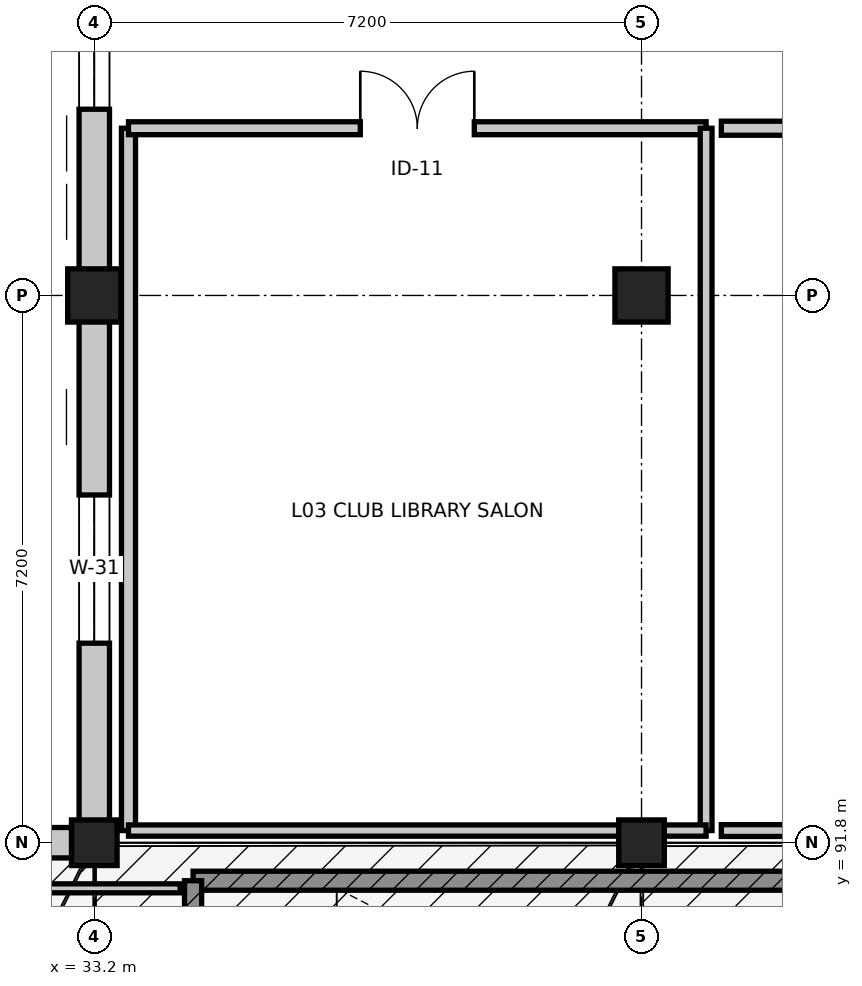
"""IFC4 building model, lengths in metres.
Left out: names, types, materials, properties, quantities, classifications, styles, units other than length and angle.
Written with IfcOpenShell. Run it as: python <this file> out.ifc"""

import sys

from ifc_helpers import new_model, si_unit, direction, frame, frame_2d, origin, origin_2d, place, context, subcontext, project, spatial, rectangle, extrude, element, fill, save


model = new_model("IFC4")
c1 = context("Model", 3, precision=1e-05, world=origin(), true_north=direction((0.0, 1.0)))
c2 = subcontext(c1, "Body", "Model", "MODEL_VIEW")
j1 = project(units=[si_unit("LENGTHUNIT", "METRE"), si_unit("PLANEANGLEUNIT", "RADIAN")], contexts=[c1])
p1 = place(None, origin())
s1 = spatial("IfcSite", under=j1, at=p1, CompositionType="ELEMENT")
p2 = place(p1, origin())
s2 = spatial("IfcBuilding", under=s1, at=p2, CompositionType="ELEMENT")
p3 = place(p2, frame((0.0, 0.0, 15.0)))
s3 = spatial("IfcBuildingStorey", under=s2, at=p3, CompositionType="ELEMENT", Elevation=15.0)
p4 = place(p3, frame((33.2, 91.8, 0.0), z_axis=(0.0, 0.0, 1.0), x_axis=(1.0, 0.0, 0.0)))
e1 = element("IfcColumn", 1, at=p4, inside=s3, PredefinedType="COLUMN", context=c2, shape_type="SweptSolid", body=[
    extrude(rectangle(XDim=0.6, YDim=0.6, at=origin_2d()), origin(), (0.0, 0.0, 1.0), 4.2),
])
p5 = place(p3, frame((33.2, 99.0, 0.0), z_axis=(0.0, 0.0, 1.0), x_axis=(1.0, 0.0, 0.0)))
e2 = element("IfcColumn", 2, at=p5, inside=s3, PredefinedType="COLUMN", context=c2, shape_type="SweptSolid", body=[
    extrude(rectangle(XDim=0.7, YDim=0.7, at=origin_2d()), origin(), (0.0, 0.0, 1.0), 4.2),
])
p6 = place(p3, frame((40.4, 91.8, 0.0), z_axis=(0.0, 0.0, 1.0), x_axis=(1.0, 0.0, 0.0)))
e3 = element("IfcColumn", 3, at=p6, inside=s3, PredefinedType="COLUMN", context=c2, shape_type="SweptSolid", body=[
    extrude(rectangle(XDim=0.6, YDim=0.6, at=origin_2d()), origin(), (0.0, 0.0, 1.0), 4.2),
])
p7 = place(p3, frame((40.4, 99.0, 0.0), z_axis=(0.0, 0.0, 1.0), x_axis=(1.0, 0.0, 0.0)))
e4 = element("IfcColumn", 4, at=p7, inside=s3, PredefinedType="COLUMN", context=c2, shape_type="SweptSolid", body=[
    extrude(rectangle(XDim=0.7, YDim=0.7, at=origin_2d()), origin(), (0.0, 0.0, 1.0), 4.2),
])
p8 = place(p3, frame((26.0, 91.8, 0.0), z_axis=(0.0, 0.0, 1.0), x_axis=(1.0, 0.0, 0.0)))
e5 = element("IfcWall", 5, at=p8, inside=s3, PredefinedType="STANDARD", context=c2, shape_type="SweptSolid", body=[
    extrude(rectangle(XDim=7.2, YDim=0.4, at=frame_2d((3.6, 0.0))), origin(), (0.0, 0.0, 1.0), 3.516),
])
p9 = place(p8, frame((2.8, 0.0, 0.9)))
e6 = element("IfcOpeningElement", 6, at=p9, cuts=e5, PredefinedType="OPENING", context=c2, shape_type="SweptSolid", body=[
    extrude(rectangle(XDim=1.6, YDim=1.95, at=frame_2d((0.8, 0.975))), frame((0.0, 0.21, 0.0), z_axis=(0.0, -1.0, 0.0), x_axis=(1.0, 0.0, 0.0)), (0.0, 0.0, 1.0), 0.42),
])
p10 = place(p8, frame((4.95, 0.0, 0.85)))
e7 = element("IfcOpeningElement", 7, at=p10, cuts=e5, PredefinedType="OPENING", context=c2, shape_type="SweptSolid", body=[
    extrude(rectangle(XDim=1.2, YDim=1.8, at=frame_2d((0.6, 0.9))), frame((0.0, 0.21, 0.0), z_axis=(0.0, -1.0, 0.0), x_axis=(1.0, 0.0, 0.0)), (0.0, 0.0, 1.0), 0.42),
])
p11 = place(p3, frame((33.2, 91.8, 0.0), z_axis=(0.0, 0.0, 1.0), x_axis=(0.0, 1.0, 0.0)))
e8 = element("IfcWall", 8, at=p11, inside=s3, PredefinedType="STANDARD", context=c2, shape_type="SweptSolid", body=[
    extrude(rectangle(XDim=7.2, YDim=0.4, at=frame_2d((3.6, 0.0))), origin(), (0.0, 0.0, 1.0), 3.275),
])
p12 = place(p11, frame((2.625, 0.0, 0.9)))
e9 = element("IfcOpeningElement", 9, at=p12, cuts=e8, PredefinedType="OPENING", context=c2, shape_type="SweptSolid", body=[
    extrude(rectangle(XDim=1.95, YDim=1.95, at=frame_2d((0.975, 0.975))), frame((0.0, 0.21, 0.0), z_axis=(0.0, -1.0, 0.0), x_axis=(1.0, 0.0, 0.0)), (0.0, 0.0, 1.0), 0.42),
])
p13 = place(p3, frame((33.2, 99.0, 0.0), z_axis=(0.0, 0.0, 1.0), x_axis=(0.0, 1.0, 0.0)))
e10 = element("IfcWall", 10, at=p13, inside=s3, PredefinedType="STANDARD", context=c2, shape_type="SweptSolid", body=[
    extrude(rectangle(XDim=7.2, YDim=0.4, at=frame_2d((3.6, 0.0))), origin(), (0.0, 0.0, 1.0), 3.275),
])
p14 = place(p13, frame((2.45, 0.0, 0.9)))
e11 = element("IfcOpeningElement", 11, at=p14, cuts=e10, PredefinedType="OPENING", context=c2, shape_type="SweptSolid", body=[
    extrude(rectangle(XDim=2.3, YDim=1.95, at=frame_2d((1.15, 0.975))), frame((0.0, 0.21, 0.0), z_axis=(0.0, -1.0, 0.0), x_axis=(1.0, 0.0, 0.0)), (0.0, 0.0, 1.0), 0.42),
])
p15 = place(p3, frame((43.1, 91.3, 0.0), z_axis=(0.0, 0.0, 1.0), x_axis=(-1.0, 0.0, 0.0)))
e12 = element("IfcWall", 12, at=p15, inside=s3, PredefinedType="SHEAR", context=c2, shape_type="SweptSolid", body=[
    extrude(rectangle(XDim=8.6, YDim=0.25, at=frame_2d((4.3, 0.0))), origin(), (0.0, 0.0, 1.0), 3.8),
])
p16 = place(p3, frame((34.5, 91.3, 0.0), z_axis=(0.0, 0.0, 1.0), x_axis=(0.0, -1.0, 0.0)))
e13 = element("IfcWall", 13, at=p16, inside=s3, PredefinedType="SHEAR", context=c2, shape_type="SweptSolid", body=[
    extrude(rectangle(XDim=3.6, YDim=0.225, at=frame_2d((1.8, 0.0))), origin(), (0.0, 0.0, 1.0), 3.8),
])
p17 = place(p3, frame((33.65, 91.96, 0.0), z_axis=(0.0, 0.0, 1.0), x_axis=(0.0, 1.0, 0.0)))
e14 = element("IfcWall", 14, at=p17, inside=s3, PredefinedType="PARTITIONING", context=c2, shape_type="SweptSolid", body=[
    extrude(rectangle(XDim=9.24, YDim=0.185, at=frame_2d((4.62, 0.0))), origin(), (0.0, 0.0, 1.0), 3.325),
])
p18 = place(p3, frame((33.65, 101.2, 0.0), z_axis=(0.0, 0.0, 1.0), x_axis=(1.0, 0.0, 0.0)))
e15 = element("IfcWall", 15, at=p18, inside=s3, PredefinedType="PARTITIONING", context=c2, shape_type="SweptSolid", body=[
    extrude(rectangle(XDim=7.6, YDim=0.17, at=frame_2d((3.8, 0.0))), origin(), (0.0, 0.0, 1.0), 3.275),
])
p19 = place(p18, frame((3.05, 0.0, 0.0)))
e16 = element("IfcOpeningElement", 16, at=p19, cuts=e15, PredefinedType="OPENING", context=c2, shape_type="SweptSolid", body=[
    extrude(rectangle(XDim=1.5, YDim=2.2, at=frame_2d((0.75, 1.1))), frame((0.0, 0.095, 0.0), z_axis=(0.0, -1.0, 0.0), x_axis=(1.0, 0.0, 0.0)), (0.0, 0.0, 1.0), 0.19),
])
p20 = place(p3, frame((41.25, 101.2, 0.0), z_axis=(0.0, 0.0, 1.0), x_axis=(0.0, -1.0, 0.0)))
e17 = element("IfcWall", 17, at=p20, inside=s3, PredefinedType="PARTITIONING", context=c2, shape_type="SweptSolid", body=[
    extrude(rectangle(XDim=9.24, YDim=0.155, at=frame_2d((4.62, 0.0))), origin(), (0.0, 0.0, 1.0), 3.325),
])
p21 = place(p3, frame((41.25, 91.96, 0.0), z_axis=(0.0, 0.0, 1.0), x_axis=(-1.0, 0.0, 0.0)))
e18 = element("IfcWall", 18, at=p21, inside=s3, PredefinedType="PARTITIONING", context=c2, shape_type="SweptSolid", body=[
    extrude(rectangle(XDim=7.6, YDim=0.148, at=frame_2d((3.8, 0.0))), origin(), (0.0, 0.0, 1.0), 3.325),
])
p22 = place(p3, frame((41.45, 101.2, 0.0), z_axis=(0.0, 0.0, 1.0), x_axis=(1.0, 0.0, 0.0)))
e19 = element("IfcWall", 19, at=p22, inside=s3, PredefinedType="PARTITIONING", context=c2, shape_type="SweptSolid", body=[
    extrude(rectangle(XDim=27.55, YDim=0.185, at=frame_2d((13.775, 0.0))), origin(), (0.0, 0.0, 1.0), 3.275),
])
p23 = place(p22, frame((12.85, 0.0, 0.0)))
e20 = element("IfcOpeningElement", 20, at=p23, cuts=e19, PredefinedType="OPENING", context=c2, shape_type="SweptSolid", body=[
    extrude(rectangle(XDim=1.85, YDim=2.3, at=frame_2d((0.925, 1.15))), frame((0.0, 0.103, 0.0), z_axis=(0.0, -1.0, 0.0), x_axis=(1.0, 0.0, 0.0)), (0.0, 0.0, 1.0), 0.205),
])
p24 = place(p3, frame((68.64, 91.96, 0.0), z_axis=(0.0, 0.0, 1.0), x_axis=(-1.0, 0.0, 0.0)))
e21 = element("IfcWall", 21, at=p24, inside=s3, PredefinedType="PARTITIONING", context=c2, shape_type="SweptSolid", body=[
    extrude(rectangle(XDim=27.19, YDim=0.155, at=frame_2d((13.595, 0.0))), origin(), (0.0, 0.0, 1.0), 3.325),
])
p25 = place(p3, frame((19.2, 91.2, 0.0), z_axis=(0.0, 0.0, 1.0), x_axis=(1.0, 0.0, 0.0)))
e22 = element("IfcWall", 22, at=p25, inside=s3, PredefinedType="PARTITIONING", context=c2, shape_type="SweptSolid", body=[
    extrude(rectangle(XDim=15.13, YDim=0.118, at=frame_2d((7.565, 0.0))), origin(), (0.0, 0.0, 1.0), 3.516),
])
p26 = place(p12, origin())
e23 = element("IfcWindow", 23, at=p26, inside=s3, PartitioningType="SINGLE_PANEL", PredefinedType="WINDOW", context=c2, shape_type="SweptSolid", body=[
    extrude(rectangle(XDim=1.95, YDim=1.95, at=frame_2d((0.975, 0.975))), frame((0.0, 0.03, 0.0), z_axis=(0.0, -1.0, 0.0), x_axis=(1.0, 0.0, 0.0)), (0.0, 0.0, 1.0), 0.06),
])
fill(e9, e23)
p27 = place(p14, origin())
e24 = element("IfcWindow", 24, at=p27, inside=s3, PartitioningType="SINGLE_PANEL", PredefinedType="WINDOW", context=c2, shape_type="SweptSolid", body=[
    extrude(rectangle(XDim=2.3, YDim=1.95, at=frame_2d((1.15, 0.975))), frame((0.0, 0.03, 0.0), z_axis=(0.0, -1.0, 0.0), x_axis=(1.0, 0.0, 0.0)), (0.0, 0.0, 1.0), 0.06),
])
fill(e11, e24)
p28 = place(p19, origin())
e25 = element("IfcDoor", 25, at=p28, inside=s3, OperationType="DOUBLE_DOOR_SINGLE_SWING", PredefinedType="DOOR", context=c2, shape_type="SweptSolid", body=[
    extrude(rectangle(XDim=1.5, YDim=2.2, at=frame_2d((0.75, 1.1))), frame((0.0, 0.025, 0.0), z_axis=(0.0, -1.0, 0.0), x_axis=(1.0, 0.0, 0.0)), (0.0, 0.0, 1.0), 0.05),
])
fill(e16, e25)
save(model, sys.argv[1])
